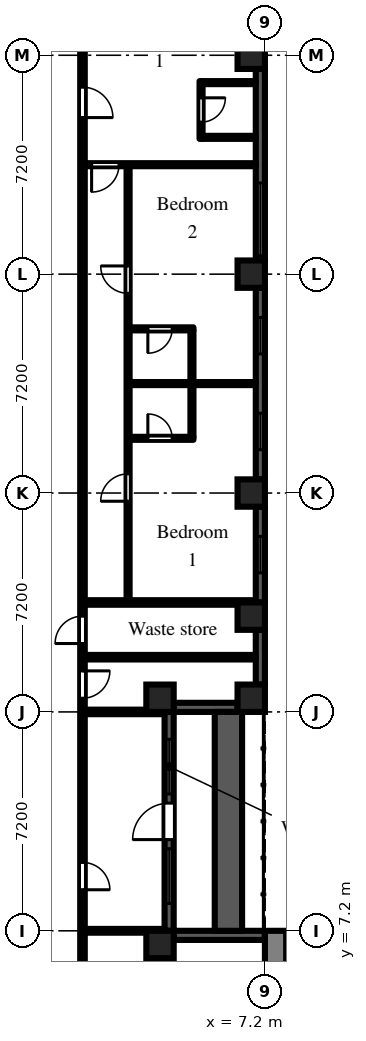
"""IFC4 building model, lengths in metres.
Left out: names, types, materials, properties, quantities, classifications, styles, units other than length and angle.
Written with IfcOpenShell. Run it as: python <this file> out.ifc"""

import sys

from ifc_helpers import new_model, si_unit, direction, frame, frame_2d, origin, origin_2d, place, context, subcontext, project, spatial, rectangle, extrude, element, fill, save


model = new_model("IFC4")
c1 = context("Model", 3, precision=1e-05, world=origin(), true_north=direction((0.0, 1.0)))
c2 = subcontext(c1, "Body", "Model", "MODEL_VIEW")
j1 = project(units=[si_unit("LENGTHUNIT", "METRE"), si_unit("PLANEANGLEUNIT", "RADIAN")], contexts=[c1])
p1 = place(None, origin())
s1 = spatial("IfcSite", under=j1, at=p1, CompositionType="ELEMENT")
p2 = place(p1, origin())
s2 = spatial("IfcBuilding", under=s1, at=p2, CompositionType="ELEMENT")
p3 = place(p2, frame((0.0, 0.0, 44.7)))
s3 = spatial("IfcBuildingStorey", under=s2, at=p3, CompositionType="ELEMENT", Elevation=44.7)
for number, where, z_axis, x_axis in (
    (1, (3.75, 6.75, 0.0), (0.0, 0.0, 1.0), (1.0, 0.0, 0.0)),
    (2, (3.75, 14.85, 0.0), (0.0, 0.0, 1.0), (1.0, 0.0, 0.0)),
    (3, (6.75, 14.85, 0.0), (0.0, 0.0, 1.0), (1.0, 0.0, 0.0)),
    (4, (6.75, 17.55, 0.0), (0.0, 0.0, 1.0), (1.0, 0.0, 0.0)),
    (5, (6.75, 21.6, 0.0), (0.0, 0.0, 1.0), (1.0, 0.0, 0.0)),
    (6, (6.75, 28.8, 0.0), (0.0, 0.0, 1.0), (1.0, 0.0, 0.0)),
    (7, (6.75, 36.0, 0.0), (0.0, 0.0, 1.0), (1.0, 0.0, 0.0)),
):
    element("IfcColumn", number, at=place(p3, frame(where, z_axis=z_axis, x_axis=x_axis)), inside=s3, PredefinedType="COLUMN", context=c2, shape_type="SweptSolid", body=[
        extrude(rectangle(XDim=0.9, YDim=0.9, at=origin_2d()), origin(), (0.0, 0.0, 1.0), 3.0),
    ])
p4 = place(p3, frame((7.2, 7.05, 0.0), z_axis=(0.0, 0.0, 1.0), x_axis=(-1.0, 0.0, 0.0)))
e8 = element("IfcWall", 8, at=p4, inside=s3, PredefinedType="SOLIDWALL", context=c2, shape_type="SweptSolid", body=[
    extrude(rectangle(XDim=3.0, YDim=0.3, at=frame_2d((1.5, 0.0))), origin(), (0.0, 0.0, 1.0), 2.1),
])
p5 = place(p3, frame((4.05, 7.2, 0.0), z_axis=(0.0, 0.0, 1.0), x_axis=(0.0, 1.0, 0.0)))
e9 = element("IfcWall", 9, at=p5, inside=s3, PredefinedType="SOLIDWALL", context=c2, shape_type="SweptSolid", body=[
    extrude(rectangle(XDim=7.2, YDim=0.3, at=frame_2d((3.6, 0.0))), origin(), (0.0, 0.0, 1.0), 2.1),
])
p6 = place(p5, frame((3.0, 0.0, 0.0)))
e10 = element("IfcOpeningElement", 10, at=p6, cuts=e9, PredefinedType="OPENING", context=c2, shape_type="SweptSolid", body=[
    extrude(rectangle(XDim=1.2, YDim=2.05, at=frame_2d((0.6, 1.025))), frame((0.0, 0.16, 0.0), z_axis=(0.0, -1.0, 0.0), x_axis=(1.0, 0.0, 0.0)), (0.0, 0.0, 1.0), 0.32),
])
p7 = place(p5, frame((0.9, 0.0, 0.2)))
e11 = element("IfcOpeningElement", 11, at=p7, cuts=e9, PredefinedType="OPENING", context=c2, shape_type="SweptSolid", body=[
    extrude(rectangle(XDim=1.8, YDim=1.85, at=frame_2d((0.9, 0.925))), frame((0.0, 0.16, 0.0), z_axis=(0.0, -1.0, 0.0), x_axis=(1.0, 0.0, 0.0)), (0.0, 0.0, 1.0), 0.32),
])
p8 = place(p5, frame((4.5, 0.0, 0.2)))
e12 = element("IfcOpeningElement", 12, at=p8, cuts=e9, PredefinedType="OPENING", context=c2, shape_type="SweptSolid", body=[
    extrude(rectangle(XDim=1.8, YDim=1.85, at=frame_2d((0.9, 0.925))), frame((0.0, 0.16, 0.0), z_axis=(0.0, -1.0, 0.0), x_axis=(1.0, 0.0, 0.0)), (0.0, 0.0, 1.0), 0.32),
])
p9 = place(p3, frame((4.2, 14.55, 0.0), z_axis=(0.0, 0.0, 1.0), x_axis=(1.0, 0.0, 0.0)))
e13 = element("IfcWall", 13, at=p9, inside=s3, PredefinedType="SOLIDWALL", context=c2, shape_type="SweptSolid", body=[
    extrude(rectangle(XDim=2.1, YDim=0.3, at=frame_2d((1.05, 0.0))), origin(), (0.0, 0.0, 1.0), 2.1),
])
p10 = place(p3, frame((7.05, 15.3, 0.0), z_axis=(0.0, 0.0, 1.0), x_axis=(0.0, 1.0, 0.0)))
e14 = element("IfcWall", 14, at=p10, inside=s3, PredefinedType="SOLIDWALL", context=c2, shape_type="SweptSolid", body=[
    extrude(rectangle(XDim=1.8, YDim=0.3, at=frame_2d((0.9, 0.0))), origin(), (0.0, 0.0, 1.0), 2.1),
])
p11 = place(p3, frame((7.05, 18.0, 0.0), z_axis=(0.0, 0.0, 1.0), x_axis=(0.0, 1.0, 0.0)))
e15 = element("IfcWall", 15, at=p11, inside=s3, PredefinedType="SOLIDWALL", context=c2, shape_type="SweptSolid", body=[
    extrude(rectangle(XDim=3.15, YDim=0.3, at=frame_2d((1.575, 0.0))), origin(), (0.0, 0.0, 1.0), 2.1),
])
p12 = place(p11, frame((0.975, 0.0, 0.2)))
e16 = element("IfcOpeningElement", 16, at=p12, cuts=e15, PredefinedType="OPENING", context=c2, shape_type="SweptSolid", body=[
    extrude(rectangle(XDim=1.2, YDim=1.85, at=frame_2d((0.6, 0.925))), frame((0.0, 0.16, 0.0), z_axis=(0.0, -1.0, 0.0), x_axis=(1.0, 0.0, 0.0)), (0.0, 0.0, 1.0), 0.32),
])
p13 = place(p3, frame((7.05, 22.05, 0.0), z_axis=(0.0, 0.0, 1.0), x_axis=(0.0, 1.0, 0.0)))
e17 = element("IfcWall", 17, at=p13, inside=s3, PredefinedType="SOLIDWALL", context=c2, shape_type="SweptSolid", body=[
    extrude(rectangle(XDim=6.3, YDim=0.3, at=frame_2d((3.15, 0.0))), origin(), (0.0, 0.0, 1.0), 2.1),
])
p14 = place(p13, frame((0.975, 0.0, 0.2)))
e18 = element("IfcOpeningElement", 18, at=p14, cuts=e17, PredefinedType="OPENING", context=c2, shape_type="SweptSolid", body=[
    extrude(rectangle(XDim=1.2, YDim=1.85, at=frame_2d((0.6, 0.925))), frame((0.0, 0.16, 0.0), z_axis=(0.0, -1.0, 0.0), x_axis=(1.0, 0.0, 0.0)), (0.0, 0.0, 1.0), 0.32),
])
p15 = place(p13, frame((4.125, 0.0, 0.2)))
e19 = element("IfcOpeningElement", 19, at=p15, cuts=e17, PredefinedType="OPENING", context=c2, shape_type="SweptSolid", body=[
    extrude(rectangle(XDim=1.2, YDim=1.85, at=frame_2d((0.6, 0.925))), frame((0.0, 0.16, 0.0), z_axis=(0.0, -1.0, 0.0), x_axis=(1.0, 0.0, 0.0)), (0.0, 0.0, 1.0), 0.32),
])
p16 = place(p3, frame((7.05, 29.25, 0.0), z_axis=(0.0, 0.0, 1.0), x_axis=(0.0, 1.0, 0.0)))
e20 = element("IfcWall", 20, at=p16, inside=s3, PredefinedType="SOLIDWALL", context=c2, shape_type="SweptSolid", body=[
    extrude(rectangle(XDim=6.3, YDim=0.3, at=frame_2d((3.15, 0.0))), origin(), (0.0, 0.0, 1.0), 2.1),
])
p17 = place(p16, frame((0.15, 0.0, 0.2)))
e21 = element("IfcOpeningElement", 21, at=p17, cuts=e20, PredefinedType="OPENING", context=c2, shape_type="SweptSolid", body=[
    extrude(rectangle(XDim=2.4, YDim=1.85, at=frame_2d((1.2, 0.925))), frame((0.0, 0.16, 0.0), z_axis=(0.0, -1.0, 0.0), x_axis=(1.0, 0.0, 0.0)), (0.0, 0.0, 1.0), 0.32),
])
p18 = place(p3, frame((6.0, 7.2, 0.0), z_axis=(0.0, 0.0, 1.0), x_axis=(0.0, 1.0, 0.0)))
e22 = element("IfcWall", 22, at=p18, inside=s3, PredefinedType="PARAPET", context=c2, shape_type="SweptSolid", body=[
    extrude(rectangle(XDim=7.2, YDim=0.9, at=frame_2d((3.6, 0.0))), origin(), (0.0, 0.0, 1.0), 0.8),
])
p19 = place(p3, frame((7.55, -7.2, 0.0), z_axis=(0.0, 0.0, 1.0), x_axis=(0.0, 1.0, 0.0)))
e23 = element("IfcWall", 23, at=p19, inside=s3, PredefinedType="SHEAR", context=c2, shape_type="SweptSolid", body=[
    extrude(rectangle(XDim=14.4, YDim=0.7, at=frame_2d((7.2, 0.0))), origin(), (0.0, 0.0, 1.0), 2.575),
])
p20 = place(p19, frame((6.0, 0.0, 0.0)))
e24 = element("IfcOpeningElement", 24, at=p20, cuts=e23, PredefinedType="OPENING", context=c2, shape_type="SweptSolid", body=[
    extrude(rectangle(XDim=2.4, YDim=2.2, at=frame_2d((1.2, 1.1))), frame((0.0, 0.36, 0.0), z_axis=(0.0, -1.0, 0.0), x_axis=(1.0, 0.0, 0.0)), (0.0, 0.0, 1.0), 0.72),
])
p21 = place(p3, frame((1.2, 1.125, 0.0), z_axis=(0.0, 0.0, 1.0), x_axis=(0.0, 1.0, 0.0)))
e25 = element("IfcWall", 25, at=p21, inside=s3, PredefinedType="PARTITIONING", context=c2, shape_type="SweptSolid", body=[
    extrude(rectangle(XDim=35.375, YDim=0.15, at=frame_2d((17.688, 0.0))), origin(), (0.0, 0.0, 1.0), 2.575),
])
p22 = place(p21, frame((3.825, 0.0, 0.0)))
e26 = element("IfcOpeningElement", 26, at=p22, cuts=e25, PredefinedType="OPENING", context=c2, shape_type="SweptSolid", body=[
    extrude(rectangle(XDim=0.9, YDim=2.1, at=frame_2d((0.45, 1.05))), frame((0.0, 0.085, 0.0), z_axis=(0.0, -1.0, 0.0), x_axis=(1.0, 0.0, 0.0)), (0.0, 0.0, 1.0), 0.17),
])
p23 = place(p21, frame((7.425, 0.0, 0.0)))
e27 = element("IfcOpeningElement", 27, at=p23, cuts=e25, PredefinedType="OPENING", context=c2, shape_type="SweptSolid", body=[
    extrude(rectangle(XDim=0.9, YDim=2.1, at=frame_2d((0.45, 1.05))), frame((0.0, 0.085, 0.0), z_axis=(0.0, -1.0, 0.0), x_axis=(1.0, 0.0, 0.0)), (0.0, 0.0, 1.0), 0.17),
])
p24 = place(p21, frame((13.725, 0.0, 0.0)))
e28 = element("IfcOpeningElement", 28, at=p24, cuts=e25, PredefinedType="OPENING", context=c2, shape_type="SweptSolid", body=[
    extrude(rectangle(XDim=0.9, YDim=2.1, at=frame_2d((0.45, 1.05))), frame((0.0, 0.085, 0.0), z_axis=(0.0, -1.0, 0.0), x_axis=(1.0, 0.0, 0.0)), (0.0, 0.0, 1.0), 0.17),
])
p25 = place(p21, frame((15.525, 0.0, 0.0)))
e29 = element("IfcOpeningElement", 29, at=p25, cuts=e25, PredefinedType="OPENING", context=c2, shape_type="SweptSolid", body=[
    extrude(rectangle(XDim=0.9, YDim=2.1, at=frame_2d((0.45, 1.05))), frame((0.0, 0.085, 0.0), z_axis=(0.0, -1.0, 0.0), x_axis=(1.0, 0.0, 0.0)), (0.0, 0.0, 1.0), 0.17),
])
p26 = place(p21, frame((32.825, 0.0, 0.0)))
e30 = element("IfcOpeningElement", 30, at=p26, cuts=e25, PredefinedType="OPENING", context=c2, shape_type="SweptSolid", body=[
    extrude(rectangle(XDim=1.0, YDim=2.1, at=frame_2d((0.5, 1.05))), frame((0.0, 0.085, 0.0), z_axis=(0.0, -1.0, 0.0), x_axis=(1.0, 0.0, 0.0)), (0.0, 0.0, 1.0), 0.17),
])
p27 = place(p3, frame((1.275, 7.2, 0.0), z_axis=(0.0, 0.0, 1.0), x_axis=(1.0, 0.0, 0.0)))
e31 = element("IfcWall", 31, at=p27, inside=s3, PredefinedType="PARTITIONING", context=c2, shape_type="SweptSolid", body=[
    extrude(rectangle(XDim=2.625, YDim=0.125, at=frame_2d((1.312, 0.0))), origin(), (0.0, 0.0, 1.0), 2.575),
])
p28 = place(p3, frame((1.275, 14.4, 0.0), z_axis=(0.0, 0.0, 1.0), x_axis=(1.0, 0.0, 0.0)))
e32 = element("IfcWall", 32, at=p28, inside=s3, PredefinedType="PARTITIONING", context=c2, shape_type="SweptSolid", body=[
    extrude(rectangle(XDim=2.625, YDim=0.15, at=frame_2d((1.312, 0.0))), origin(), (0.0, 0.0, 1.0), 2.575),
])
for number, where, z_axis, x_axis in (
    (33, (1.275, 16.2, 0.0), (0.0, 0.0, 1.0), (1.0, 0.0, 0.0)),
    (34, (1.275, 18.0, 0.0), (0.0, 0.0, 1.0), (1.0, 0.0, 0.0)),
):
    element("IfcWall", number, at=place(p3, frame(where, z_axis=z_axis, x_axis=x_axis)), inside=s3, PredefinedType="PARTITIONING", context=c2, shape_type="SweptSolid", body=[
        extrude(rectangle(XDim=5.625, YDim=0.15, at=frame_2d((2.812, 0.0))), origin(), (0.0, 0.0, 1.0), 2.575),
    ])
p29 = place(p3, frame((1.275, 32.4, 0.0), z_axis=(0.0, 0.0, 1.0), x_axis=(1.0, 0.0, 0.0)))
e35 = element("IfcWall", 35, at=p29, inside=s3, PredefinedType="PARTITIONING", context=c2, shape_type="SweptSolid", body=[
    extrude(rectangle(XDim=5.625, YDim=0.1, at=frame_2d((2.812, 0.0))), origin(), (0.0, 0.0, 1.0), 2.575),
])
p30 = place(p29, frame((0.225, 0.0, 0.0)))
e36 = element("IfcOpeningElement", 36, at=p30, cuts=e35, PredefinedType="OPENING", context=c2, shape_type="SweptSolid", body=[
    extrude(rectangle(XDim=0.9, YDim=2.1, at=frame_2d((0.45, 1.05))), frame((0.0, 0.06, 0.0), z_axis=(0.0, -1.0, 0.0), x_axis=(1.0, 0.0, 0.0)), (0.0, 0.0, 1.0), 0.12),
])
p31 = place(p3, frame((2.7, 18.075, 0.0), z_axis=(0.0, 0.0, 1.0), x_axis=(0.0, 1.0, 0.0)))
e37 = element("IfcWall", 37, at=p31, inside=s3, PredefinedType="PARTITIONING", context=c2, shape_type="SweptSolid", body=[
    extrude(rectangle(XDim=14.275, YDim=0.1, at=frame_2d((7.138, 0.0))), origin(), (0.0, 0.0, 1.0), 2.575),
])
p32 = place(p31, frame((3.255, 0.0, 0.0)))
e38 = element("IfcOpeningElement", 38, at=p32, cuts=e37, PredefinedType="OPENING", context=c2, shape_type="SweptSolid", body=[
    extrude(rectangle(XDim=0.9, YDim=2.1, at=frame_2d((0.45, 1.05))), frame((0.0, 0.06, 0.0), z_axis=(0.0, -1.0, 0.0), x_axis=(1.0, 0.0, 0.0)), (0.0, 0.0, 1.0), 0.12),
])
p33 = place(p31, frame((10.095, 0.0, 0.0)))
e39 = element("IfcOpeningElement", 39, at=p33, cuts=e37, PredefinedType="OPENING", context=c2, shape_type="SweptSolid", body=[
    extrude(rectangle(XDim=0.9, YDim=2.1, at=frame_2d((0.45, 1.05))), frame((0.0, 0.06, 0.0), z_axis=(0.0, -1.0, 0.0), x_axis=(1.0, 0.0, 0.0)), (0.0, 0.0, 1.0), 0.12),
])
p34 = place(p3, frame((2.75, 23.4, 0.0), z_axis=(0.0, 0.0, 1.0), x_axis=(1.0, 0.0, 0.0)))
e40 = element("IfcWall", 40, at=p34, inside=s3, PredefinedType="PARTITIONING", context=c2, shape_type="SweptSolid", body=[
    extrude(rectangle(XDim=2.1, YDim=0.1, at=frame_2d((1.05, 0.0))), origin(), (0.0, 0.0, 1.0), 2.575),
])
p35 = place(p34, frame((0.6, 0.0, 0.0)))
e41 = element("IfcOpeningElement", 41, at=p35, cuts=e40, PredefinedType="OPENING", context=c2, shape_type="SweptSolid", body=[
    extrude(rectangle(XDim=0.8, YDim=2.1, at=frame_2d((0.4, 1.05))), frame((0.0, 0.06, 0.0), z_axis=(0.0, -1.0, 0.0), x_axis=(1.0, 0.0, 0.0)), (0.0, 0.0, 1.0), 0.12),
])
p36 = place(p3, frame((2.75, 25.2, 0.0), z_axis=(0.0, 0.0, 1.0), x_axis=(1.0, 0.0, 0.0)))
e42 = element("IfcWall", 42, at=p36, inside=s3, PredefinedType="PARTITIONING", context=c2, shape_type="SweptSolid", body=[
    extrude(rectangle(XDim=4.15, YDim=0.1, at=frame_2d((2.075, 0.0))), origin(), (0.0, 0.0, 1.0), 2.575),
])
p37 = place(p3, frame((2.75, 27.0, 0.0), z_axis=(0.0, 0.0, 1.0), x_axis=(1.0, 0.0, 0.0)))
e43 = element("IfcWall", 43, at=p37, inside=s3, PredefinedType="PARTITIONING", context=c2, shape_type="SweptSolid", body=[
    extrude(rectangle(XDim=2.1, YDim=0.1, at=frame_2d((1.05, 0.0))), origin(), (0.0, 0.0, 1.0), 2.575),
])
p38 = place(p37, frame((0.6, 0.0, 0.0)))
e44 = element("IfcOpeningElement", 44, at=p38, cuts=e43, PredefinedType="OPENING", context=c2, shape_type="SweptSolid", body=[
    extrude(rectangle(XDim=0.8, YDim=2.1, at=frame_2d((0.4, 1.05))), frame((0.0, 0.06, 0.0), z_axis=(0.0, -1.0, 0.0), x_axis=(1.0, 0.0, 0.0)), (0.0, 0.0, 1.0), 0.12),
])
p39 = place(p3, frame((4.8, 23.45, 0.0), z_axis=(0.0, 0.0, 1.0), x_axis=(0.0, 1.0, 0.0)))
e45 = element("IfcWall", 45, at=p39, inside=s3, PredefinedType="PARTITIONING", context=c2, shape_type="SweptSolid", body=[
    extrude(rectangle(XDim=3.5, YDim=0.1, at=frame_2d((1.75, 0.0))), origin(), (0.0, 0.0, 1.0), 2.575),
])
p40 = place(p3, frame((5.1, 33.25, 0.0), z_axis=(0.0, 0.0, 1.0), x_axis=(0.0, 1.0, 0.0)))
e46 = element("IfcWall", 46, at=p40, inside=s3, PredefinedType="PARTITIONING", context=c2, shape_type="SweptSolid", body=[
    extrude(rectangle(XDim=1.9, YDim=0.1, at=frame_2d((0.95, 0.0))), origin(), (0.0, 0.0, 1.0), 2.575),
])
p41 = place(p40, frame((0.55, 0.0, 0.0)))
e47 = element("IfcOpeningElement", 47, at=p41, cuts=e46, PredefinedType="OPENING", context=c2, shape_type="SweptSolid", body=[
    extrude(rectangle(XDim=0.8, YDim=2.1, at=frame_2d((0.4, 1.05))), frame((0.0, 0.06, 0.0), z_axis=(0.0, -1.0, 0.0), x_axis=(1.0, 0.0, 0.0)), (0.0, 0.0, 1.0), 0.12),
])
for number, where, z_axis, x_axis in (
    (48, (5.15, 33.3, 0.0), (0.0, 0.0, 1.0), (1.0, 0.0, 0.0)),
    (49, (5.15, 35.1, 0.0), (0.0, 0.0, 1.0), (1.0, 0.0, 0.0)),
):
    element("IfcWall", number, at=place(p3, frame(where, z_axis=z_axis, x_axis=x_axis)), inside=s3, PredefinedType="PARTITIONING", context=c2, shape_type="SweptSolid", body=[
        extrude(rectangle(XDim=1.75, YDim=0.1, at=frame_2d((0.875, 0.0))), origin(), (0.0, 0.0, 1.0), 2.575),
    ])
p42 = place(p6, origin())
e50 = element("IfcDoor", 50, at=p42, inside=s3, OperationType="SINGLE_SWING_LEFT", PredefinedType="DOOR", context=c2, shape_type="SweptSolid", body=[
    extrude(rectangle(XDim=1.2, YDim=2.05, at=frame_2d((0.6, 1.025))), frame((0.0, 0.025, 0.0), z_axis=(0.0, -1.0, 0.0), x_axis=(1.0, 0.0, 0.0)), (0.0, 0.0, 1.0), 0.05),
])
fill(e10, e50)
p43 = place(p7, origin())
e51 = element("IfcWindow", 51, at=p43, inside=s3, PartitioningType="SINGLE_PANEL", PredefinedType="WINDOW", context=c2, shape_type="SweptSolid", body=[
    extrude(rectangle(XDim=1.8, YDim=1.85, at=frame_2d((0.9, 0.925))), frame((0.0, 0.03, 0.0), z_axis=(0.0, -1.0, 0.0), x_axis=(1.0, 0.0, 0.0)), (0.0, 0.0, 1.0), 0.06),
])
fill(e11, e51)
p44 = place(p8, origin())
e52 = element("IfcWindow", 52, at=p44, inside=s3, PartitioningType="SINGLE_PANEL", PredefinedType="WINDOW", context=c2, shape_type="SweptSolid", body=[
    extrude(rectangle(XDim=1.8, YDim=1.85, at=frame_2d((0.9, 0.925))), frame((0.0, 0.03, 0.0), z_axis=(0.0, -1.0, 0.0), x_axis=(1.0, 0.0, 0.0)), (0.0, 0.0, 1.0), 0.06),
])
fill(e12, e52)
p45 = place(p12, origin())
e53 = element("IfcWindow", 53, at=p45, inside=s3, PartitioningType="SINGLE_PANEL", PredefinedType="WINDOW", context=c2, shape_type="SweptSolid", body=[
    extrude(rectangle(XDim=1.2, YDim=1.85, at=frame_2d((0.6, 0.925))), frame((0.0, 0.03, 0.0), z_axis=(0.0, -1.0, 0.0), x_axis=(1.0, 0.0, 0.0)), (0.0, 0.0, 1.0), 0.06),
])
fill(e16, e53)
p46 = place(p14, origin())
e54 = element("IfcWindow", 54, at=p46, inside=s3, PartitioningType="SINGLE_PANEL", PredefinedType="WINDOW", context=c2, shape_type="SweptSolid", body=[
    extrude(rectangle(XDim=1.2, YDim=1.85, at=frame_2d((0.6, 0.925))), frame((0.0, 0.03, 0.0), z_axis=(0.0, -1.0, 0.0), x_axis=(1.0, 0.0, 0.0)), (0.0, 0.0, 1.0), 0.06),
])
fill(e18, e54)
p47 = place(p15, origin())
e55 = element("IfcWindow", 55, at=p47, inside=s3, PartitioningType="SINGLE_PANEL", PredefinedType="WINDOW", context=c2, shape_type="SweptSolid", body=[
    extrude(rectangle(XDim=1.2, YDim=1.85, at=frame_2d((0.6, 0.925))), frame((0.0, 0.03, 0.0), z_axis=(0.0, -1.0, 0.0), x_axis=(1.0, 0.0, 0.0)), (0.0, 0.0, 1.0), 0.06),
])
fill(e19, e55)
p48 = place(p17, origin())
e56 = element("IfcWindow", 56, at=p48, inside=s3, PartitioningType="SINGLE_PANEL", PredefinedType="WINDOW", context=c2, shape_type="SweptSolid", body=[
    extrude(rectangle(XDim=2.4, YDim=1.85, at=frame_2d((1.2, 0.925))), frame((0.0, 0.03, 0.0), z_axis=(0.0, -1.0, 0.0), x_axis=(1.0, 0.0, 0.0)), (0.0, 0.0, 1.0), 0.06),
])
fill(e21, e56)
p49 = place(p23, frame((0.9, 0.0, 0.0), z_axis=(0.0, 0.0, 1.0), x_axis=(-1.0, 0.0, 0.0)))
e57 = element("IfcDoor", 57, at=p49, inside=s3, OperationType="SINGLE_SWING_RIGHT", PredefinedType="DOOR", context=c2, shape_type="SweptSolid", body=[
    extrude(rectangle(XDim=0.9, YDim=2.1, at=frame_2d((0.45, 1.05))), frame((0.0, 0.025, 0.0), z_axis=(0.0, -1.0, 0.0), x_axis=(1.0, 0.0, 0.0)), (0.0, 0.0, 1.0), 0.05),
])
fill(e27, e57)
p50 = place(p24, frame((0.9, 0.0, 0.0), z_axis=(0.0, 0.0, 1.0), x_axis=(-1.0, 0.0, 0.0)))
e58 = element("IfcDoor", 58, at=p50, inside=s3, OperationType="SINGLE_SWING_LEFT", PredefinedType="DOOR", context=c2, shape_type="SweptSolid", body=[
    extrude(rectangle(XDim=0.9, YDim=2.1, at=frame_2d((0.45, 1.05))), frame((0.0, 0.025, 0.0), z_axis=(0.0, -1.0, 0.0), x_axis=(1.0, 0.0, 0.0)), (0.0, 0.0, 1.0), 0.05),
])
fill(e28, e58)
p51 = place(p25, origin())
e59 = element("IfcDoor", 59, at=p51, inside=s3, OperationType="SINGLE_SWING_LEFT", PredefinedType="DOOR", context=c2, shape_type="SweptSolid", body=[
    extrude(rectangle(XDim=0.9, YDim=2.1, at=frame_2d((0.45, 1.05))), frame((0.0, 0.025, 0.0), z_axis=(0.0, -1.0, 0.0), x_axis=(1.0, 0.0, 0.0)), (0.0, 0.0, 1.0), 0.05),
])
fill(e29, e59)
p52 = place(p41, frame((0.8, 0.0, 0.0), z_axis=(0.0, 0.0, 1.0), x_axis=(-1.0, 0.0, 0.0)))
e60 = element("IfcDoor", 60, at=p52, inside=s3, OperationType="SINGLE_SWING_LEFT", PredefinedType="DOOR", context=c2, shape_type="SweptSolid", body=[
    extrude(rectangle(XDim=0.8, YDim=2.1, at=frame_2d((0.4, 1.05))), frame((0.0, 0.025, 0.0), z_axis=(0.0, -1.0, 0.0), x_axis=(1.0, 0.0, 0.0)), (0.0, 0.0, 1.0), 0.05),
])
fill(e47, e60)
p53 = place(p26, frame((1.0, 0.0, 0.0), z_axis=(0.0, 0.0, 1.0), x_axis=(-1.0, 0.0, 0.0)))
e61 = element("IfcDoor", 61, at=p53, inside=s3, OperationType="SINGLE_SWING_RIGHT", PredefinedType="DOOR", context=c2, shape_type="SweptSolid", body=[
    extrude(rectangle(XDim=1.0, YDim=2.1, at=frame_2d((0.5, 1.05))), frame((0.0, 0.025, 0.0), z_axis=(0.0, -1.0, 0.0), x_axis=(1.0, 0.0, 0.0)), (0.0, 0.0, 1.0), 0.05),
])
fill(e30, e61)
p54 = place(p30, frame((0.9, 0.0, 0.0), z_axis=(0.0, 0.0, 1.0), x_axis=(-1.0, 0.0, 0.0)))
e62 = element("IfcDoor", 62, at=p54, inside=s3, OperationType="SINGLE_SWING_RIGHT", PredefinedType="DOOR", context=c2, shape_type="SweptSolid", body=[
    extrude(rectangle(XDim=0.9, YDim=2.1, at=frame_2d((0.45, 1.05))), frame((0.0, 0.025, 0.0), z_axis=(0.0, -1.0, 0.0), x_axis=(1.0, 0.0, 0.0)), (0.0, 0.0, 1.0), 0.05),
])
fill(e36, e62)
p55 = place(p32, origin())
e63 = element("IfcDoor", 63, at=p55, inside=s3, OperationType="SINGLE_SWING_LEFT", PredefinedType="DOOR", context=c2, shape_type="SweptSolid", body=[
    extrude(rectangle(XDim=0.9, YDim=2.1, at=frame_2d((0.45, 1.05))), frame((0.0, 0.025, 0.0), z_axis=(0.0, -1.0, 0.0), x_axis=(1.0, 0.0, 0.0)), (0.0, 0.0, 1.0), 0.05),
])
fill(e38, e63)
p56 = place(p33, origin())
e64 = element("IfcDoor", 64, at=p56, inside=s3, OperationType="SINGLE_SWING_RIGHT", PredefinedType="DOOR", context=c2, shape_type="SweptSolid", body=[
    extrude(rectangle(XDim=0.9, YDim=2.1, at=frame_2d((0.45, 1.05))), frame((0.0, 0.025, 0.0), z_axis=(0.0, -1.0, 0.0), x_axis=(1.0, 0.0, 0.0)), (0.0, 0.0, 1.0), 0.05),
])
fill(e39, e64)
p57 = place(p35, origin())
e65 = element("IfcDoor", 65, at=p57, inside=s3, OperationType="SINGLE_SWING_LEFT", PredefinedType="DOOR", context=c2, shape_type="SweptSolid", body=[
    extrude(rectangle(XDim=0.8, YDim=2.1, at=frame_2d((0.4, 1.05))), frame((0.0, 0.025, 0.0), z_axis=(0.0, -1.0, 0.0), x_axis=(1.0, 0.0, 0.0)), (0.0, 0.0, 1.0), 0.05),
])
fill(e41, e65)
p58 = place(p38, frame((0.8, 0.0, 0.0), z_axis=(0.0, 0.0, 1.0), x_axis=(-1.0, 0.0, 0.0)))
e66 = element("IfcDoor", 66, at=p58, inside=s3, OperationType="SINGLE_SWING_RIGHT", PredefinedType="DOOR", context=c2, shape_type="SweptSolid", body=[
    extrude(rectangle(XDim=0.8, YDim=2.1, at=frame_2d((0.4, 1.05))), frame((0.0, 0.025, 0.0), z_axis=(0.0, -1.0, 0.0), x_axis=(1.0, 0.0, 0.0)), (0.0, 0.0, 1.0), 0.05),
])
fill(e44, e66)
save(model, sys.argv[1])
